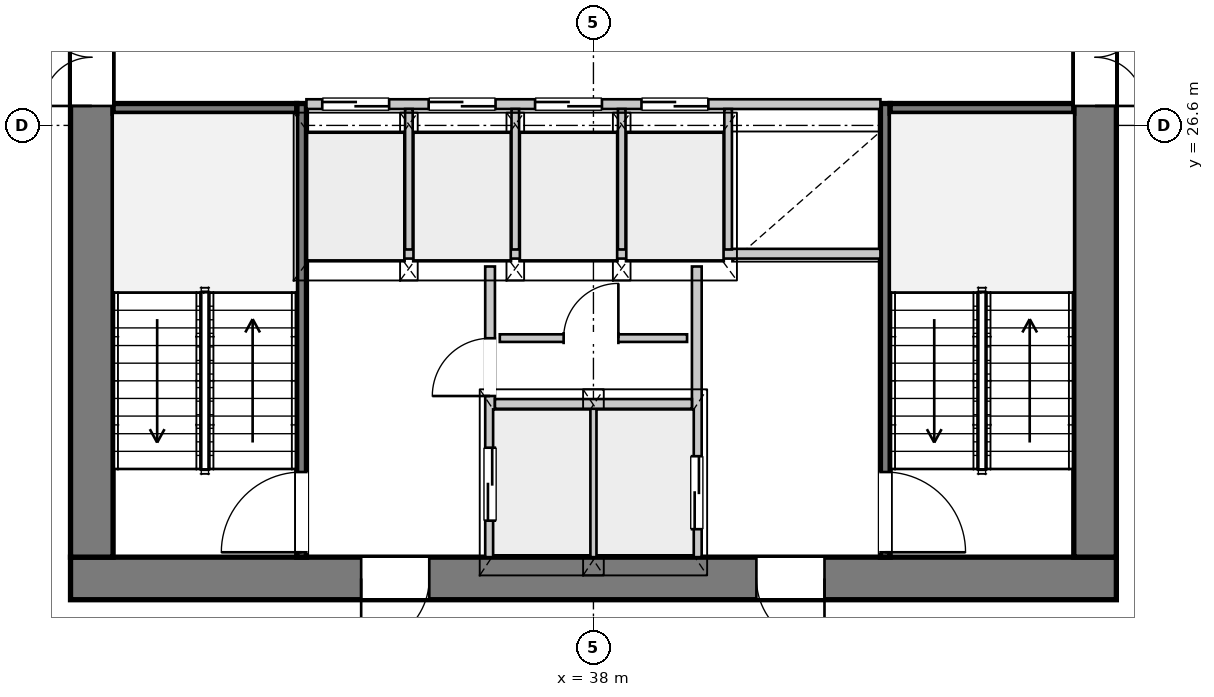
"""IFC4 building model, lengths in metres.
Left out: names, types, materials, properties, quantities, classifications, styles, units other than length and angle.
Written with IfcOpenShell. Run it as: python <this file> out.ifc"""

import sys

from ifc_helpers import new_model, si_unit, direction, frame, frame_2d, origin, place, context, subcontext, project, spatial, rectangle, extrude, source, transform, mapped, element, fill, save


model = new_model("IFC4")
c1 = context("Model", 3, precision=1e-05, world=origin(), true_north=direction((0.0, 1.0)))
c2 = subcontext(c1, "Body", "Model", "MODEL_VIEW")
j1 = project(units=[si_unit("LENGTHUNIT", "METRE"), si_unit("PLANEANGLEUNIT", "RADIAN")], contexts=[c1])
p1 = place(None, origin())
s1 = spatial("IfcSite", under=j1, at=p1, CompositionType="ELEMENT")
p2 = place(p1, origin())
s2 = spatial("IfcBuilding", under=s1, at=p2, CompositionType="ELEMENT")
p3 = place(p2, frame((0.0, 0.0, 102.15)))
s3 = spatial("IfcBuildingStorey", under=s2, at=p3, CompositionType="ELEMENT", Elevation=102.15)
p4 = place(p3, frame((46.6, 19.15, 0.0), z_axis=(0.0, 0.0, 1.0), x_axis=(-1.0, 0.0, 0.0)))
e1 = element("IfcWall", 1, at=p4, inside=s3, PredefinedType="SHEAR", context=c2, shape_type="SweptSolid", body=[
    extrude(rectangle(XDim=17.2, YDim=0.7, at=frame_2d((8.6, 0.0))), origin(), (0.0, 0.0, 1.0), 3.3),
])
p5 = place(p4, frame((4.8, 0.0, 0.0)))
e2 = element("IfcOpeningElement", 2, at=p5, cuts=e1, PredefinedType="OPENING", context=c2, shape_type="SweptSolid", body=[
    extrude(rectangle(XDim=1.12, YDim=2.25, at=frame_2d((0.56, 1.125))), frame((0.0, 0.36, 0.0), z_axis=(0.0, -1.0, 0.0), x_axis=(1.0, 0.0, 0.0)), (0.0, 0.0, 1.0), 0.72),
])
p6 = place(p4, frame((11.3, 0.0, 0.0)))
e3 = element("IfcOpeningElement", 3, at=p6, cuts=e1, PredefinedType="OPENING", context=c2, shape_type="SweptSolid", body=[
    extrude(rectangle(XDim=1.12, YDim=2.25, at=frame_2d((0.56, 1.125))), frame((0.0, 0.36, 0.0), z_axis=(0.0, -1.0, 0.0), x_axis=(1.0, 0.0, 0.0)), (0.0, 0.0, 1.0), 0.72),
])
p7 = place(p3, frame((29.75, 19.5, 0.0), z_axis=(0.0, 0.0, 1.0), x_axis=(0.0, 1.0, 0.0)))
e4 = element("IfcWall", 4, at=p7, inside=s3, PredefinedType="SHEAR", context=c2, shape_type="SweptSolid", body=[
    extrude(rectangle(XDim=14.2, YDim=0.7, at=frame_2d((7.1, 0.0))), origin(), (0.0, 0.0, 1.0), 3.3),
])
p8 = place(p7, frame((7.42, 0.0, 0.0)))
e5 = element("IfcOpeningElement", 5, at=p8, cuts=e4, PredefinedType="OPENING", context=c2, shape_type="SweptSolid", body=[
    extrude(rectangle(XDim=1.6, YDim=2.2, at=frame_2d((0.8, 1.1))), frame((0.0, 0.36, 0.0), z_axis=(0.0, -1.0, 0.0), x_axis=(1.0, 0.0, 0.0)), (0.0, 0.0, 1.0), 0.72),
])
p9 = place(p3, frame((46.25, 33.7, 0.0), z_axis=(0.0, 0.0, 1.0), x_axis=(0.0, -1.0, 0.0)))
e6 = element("IfcWall", 6, at=p9, inside=s3, PredefinedType="SHEAR", context=c2, shape_type="SweptSolid", body=[
    extrude(rectangle(XDim=14.2, YDim=0.7, at=frame_2d((7.1, 0.0))), origin(), (0.0, 0.0, 1.0), 3.3),
])
p10 = place(p9, frame((5.18, 0.0, 0.0)))
e7 = element("IfcOpeningElement", 7, at=p10, cuts=e6, PredefinedType="OPENING", context=c2, shape_type="SweptSolid", body=[
    extrude(rectangle(XDim=1.6, YDim=2.2, at=frame_2d((0.8, 1.1))), frame((0.0, 0.36, 0.0), z_axis=(0.0, -1.0, 0.0), x_axis=(1.0, 0.0, 0.0)), (0.0, 0.0, 1.0), 0.72),
])
p11 = place(p3, frame((33.2, 19.5, 0.0), z_axis=(0.0, 0.0, 1.0), x_axis=(0.0, 1.0, 0.0)))
e8 = element("IfcWall", 8, at=p11, inside=s3, PredefinedType="PARTITIONING", context=c2, shape_type="SweptSolid", body=[
    extrude(rectangle(XDim=7.46, YDim=0.16, at=frame_2d((3.73, 0.0))), origin(), (0.0, 0.0, 1.0), 3.3),
])
p12 = place(p11, frame((0.08, 0.0, 0.0)))
e9 = element("IfcOpeningElement", 9, at=p12, cuts=e8, PredefinedType="OPENING", context=c2, shape_type="SweptSolid", body=[
    extrude(rectangle(XDim=1.32, YDim=2.2, at=frame_2d((0.66, 1.1))), frame((0.0, 0.09, 0.0), z_axis=(0.0, -1.0, 0.0), x_axis=(1.0, 0.0, 0.0)), (0.0, 0.0, 1.0), 0.18),
])
p13 = place(p3, frame((30.1, 26.88, 0.0), z_axis=(0.0, 0.0, 1.0), x_axis=(1.0, 0.0, 0.0)))
e10 = element("IfcWall", 10, at=p13, inside=s3, PredefinedType="PARTITIONING", context=c2, shape_type="SweptSolid", body=[
    extrude(rectangle(XDim=3.02, YDim=0.16, at=frame_2d((1.51, 0.0))), origin(), (0.0, 0.0, 1.0), 3.3),
])
p14 = place(p3, frame((42.8, 26.96, 0.0), z_axis=(0.0, 0.0, 1.0), x_axis=(0.0, -1.0, 0.0)))
e11 = element("IfcWall", 11, at=p14, inside=s3, PredefinedType="PARTITIONING", context=c2, shape_type="SweptSolid", body=[
    extrude(rectangle(XDim=7.46, YDim=0.16, at=frame_2d((3.73, 0.0))), origin(), (0.0, 0.0, 1.0), 3.3),
])
p15 = place(p14, frame((6.06, 0.0, 0.0)))
e12 = element("IfcOpeningElement", 12, at=p15, cuts=e11, PredefinedType="OPENING", context=c2, shape_type="SweptSolid", body=[
    extrude(rectangle(XDim=1.32, YDim=2.2, at=frame_2d((0.66, 1.1))), frame((0.0, 0.09, 0.0), z_axis=(0.0, -1.0, 0.0), x_axis=(1.0, 0.0, 0.0)), (0.0, 0.0, 1.0), 0.18),
])
p16 = place(p3, frame((42.88, 26.88, 0.0), z_axis=(0.0, 0.0, 1.0), x_axis=(1.0, 0.0, 0.0)))
e13 = element("IfcWall", 13, at=p16, inside=s3, PredefinedType="PARTITIONING", context=c2, shape_type="SweptSolid", body=[
    extrude(rectangle(XDim=3.02, YDim=0.16, at=frame_2d((1.51, 0.0))), origin(), (0.0, 0.0, 1.0), 3.3),
])
p17 = place(p3, frame((36.3, 19.5, 0.0), z_axis=(0.0, 0.0, 1.0), x_axis=(0.0, 1.0, 0.0)))
e14 = element("IfcWall", 14, at=p17, inside=s3, PredefinedType="PARTITIONING", context=c2, shape_type="SweptSolid", body=[
    extrude(rectangle(XDim=4.78, YDim=0.16, at=frame_2d((2.39, 0.0))), origin(), (0.0, 0.0, 1.0), 3.3),
])
p18 = place(p17, frame((0.6, 0.0, 0.0)))
e15 = element("IfcOpeningElement", 15, at=p18, cuts=e14, PredefinedType="OPENING", context=c2, shape_type="SweptSolid", body=[
    extrude(rectangle(XDim=1.2, YDim=2.2, at=frame_2d((0.6, 1.1))), frame((0.0, 0.09, 0.0), z_axis=(0.0, -1.0, 0.0), x_axis=(1.0, 0.0, 0.0)), (0.0, 0.0, 1.0), 0.18),
])
p19 = place(p17, frame((2.65, 0.0, 0.0)))
e16 = element("IfcOpeningElement", 16, at=p19, cuts=e14, PredefinedType="OPENING", context=c2, shape_type="SweptSolid", body=[
    extrude(rectangle(XDim=0.95, YDim=2.1, at=frame_2d((0.475, 1.05))), frame((0.0, 0.09, 0.0), z_axis=(0.0, -1.0, 0.0), x_axis=(1.0, 0.0, 0.0)), (0.0, 0.0, 1.0), 0.18),
])
p20 = place(p3, frame((39.7, 24.28, 0.0), z_axis=(0.0, 0.0, 1.0), x_axis=(0.0, -1.0, 0.0)))
e17 = element("IfcWall", 17, at=p20, inside=s3, PredefinedType="PARTITIONING", context=c2, shape_type="SweptSolid", body=[
    extrude(rectangle(XDim=4.78, YDim=0.16, at=frame_2d((2.39, 0.0))), origin(), (0.0, 0.0, 1.0), 3.3),
])
p21 = place(p20, frame((3.12, 0.0, 0.0)))
e18 = element("IfcOpeningElement", 18, at=p21, cuts=e17, PredefinedType="OPENING", context=c2, shape_type="SweptSolid", body=[
    extrude(rectangle(XDim=1.2, YDim=2.2, at=frame_2d((0.6, 1.1))), frame((0.0, 0.09, 0.0), z_axis=(0.0, -1.0, 0.0), x_axis=(1.0, 0.0, 0.0)), (0.0, 0.0, 1.0), 0.18),
])
p22 = place(p3, frame((38.0, 19.5, 0.0), z_axis=(0.0, 0.0, 1.0), x_axis=(0.0, 1.0, 0.0)))
e19 = element("IfcWall", 19, at=p22, inside=s3, PredefinedType="PARTITIONING", context=c2, shape_type="SweptSolid", body=[
    extrude(rectangle(XDim=2.46, YDim=0.125, at=frame_2d((1.23, 0.0))), origin(), (0.0, 0.0, 1.0), 3.3),
])
p23 = place(p3, frame((36.38, 22.02, 0.0), z_axis=(0.0, 0.0, 1.0), x_axis=(1.0, 0.0, 0.0)))
e20 = element("IfcWall", 20, at=p23, inside=s3, PredefinedType="PARTITIONING", context=c2, shape_type="SweptSolid", body=[
    extrude(rectangle(XDim=3.24, YDim=0.16, at=frame_2d((1.62, 0.0))), origin(), (0.0, 0.0, 1.0), 3.3),
])
p24 = place(p3, frame((33.28, 24.49, 0.0), z_axis=(0.0, 0.0, 1.0), x_axis=(1.0, 0.0, 0.0)))
e21 = element("IfcWall", 21, at=p24, inside=s3, PredefinedType="PARTITIONING", context=c2, shape_type="SweptSolid", body=[
    extrude(rectangle(XDim=9.44, YDim=0.16, at=frame_2d((4.72, 0.0))), origin(), (0.0, 0.0, 1.0), 3.3),
])
p25 = place(p3, frame((36.46, 23.102, 0.0), z_axis=(0.0, 0.0, 1.0), x_axis=(1.0, 0.0, 0.0)))
e22 = element("IfcWall", 22, at=p25, inside=s3, PredefinedType="PARTITIONING", context=c2, shape_type="SweptSolid", body=[
    extrude(rectangle(XDim=3.08, YDim=0.125, at=frame_2d((1.54, 0.0))), origin(), (0.0, 0.0, 1.0), 3.3),
])
p26 = place(p25, frame((1.05, 0.0, 0.0)))
e23 = element("IfcOpeningElement", 23, at=p26, cuts=e22, PredefinedType="OPENING", context=c2, shape_type="SweptSolid", body=[
    extrude(rectangle(XDim=0.9, YDim=2.1, at=frame_2d((0.45, 1.05))), frame((0.0, 0.073, 0.0), z_axis=(0.0, -1.0, 0.0), x_axis=(1.0, 0.0, 0.0)), (0.0, 0.0, 1.0), 0.145),
])
p27 = place(p3, frame((33.28, 26.95, 0.0), z_axis=(0.0, 0.0, 1.0), x_axis=(1.0, 0.0, 0.0)))
e24 = element("IfcWall", 24, at=p27, inside=s3, PredefinedType="PARTITIONING", context=c2, shape_type="SweptSolid", body=[
    extrude(rectangle(XDim=9.44, YDim=0.16, at=frame_2d((4.72, 0.0))), origin(), (0.0, 0.0, 1.0), 3.3),
])
p28 = place(p27, frame((0.26, 0.0, 0.0)))
e25 = element("IfcOpeningElement", 25, at=p28, cuts=e24, PredefinedType="OPENING", context=c2, shape_type="SweptSolid", body=[
    extrude(rectangle(XDim=1.1, YDim=2.2, at=frame_2d((0.55, 1.1))), frame((0.0, 0.09, 0.0), z_axis=(0.0, -1.0, 0.0), x_axis=(1.0, 0.0, 0.0)), (0.0, 0.0, 1.0), 0.18),
])
p29 = place(p27, frame((2.01, 0.0, 0.0)))
e26 = element("IfcOpeningElement", 26, at=p29, cuts=e24, PredefinedType="OPENING", context=c2, shape_type="SweptSolid", body=[
    extrude(rectangle(XDim=1.1, YDim=2.2, at=frame_2d((0.55, 1.1))), frame((0.0, 0.09, 0.0), z_axis=(0.0, -1.0, 0.0), x_axis=(1.0, 0.0, 0.0)), (0.0, 0.0, 1.0), 0.18),
])
p30 = place(p27, frame((3.76, 0.0, 0.0)))
e27 = element("IfcOpeningElement", 27, at=p30, cuts=e24, PredefinedType="OPENING", context=c2, shape_type="SweptSolid", body=[
    extrude(rectangle(XDim=1.1, YDim=2.2, at=frame_2d((0.55, 1.1))), frame((0.0, 0.09, 0.0), z_axis=(0.0, -1.0, 0.0), x_axis=(1.0, 0.0, 0.0)), (0.0, 0.0, 1.0), 0.18),
])
p31 = place(p27, frame((5.51, 0.0, 0.0)))
e28 = element("IfcOpeningElement", 28, at=p31, cuts=e24, PredefinedType="OPENING", context=c2, shape_type="SweptSolid", body=[
    extrude(rectangle(XDim=1.1, YDim=2.2, at=frame_2d((0.55, 1.1))), frame((0.0, 0.09, 0.0), z_axis=(0.0, -1.0, 0.0), x_axis=(1.0, 0.0, 0.0)), (0.0, 0.0, 1.0), 0.18),
])
for number, where, z_axis, x_axis in (
    (29, (34.965, 24.56, 0.0), (0.0, 0.0, 1.0), (0.0, 1.0, 0.0)),
    (30, (36.715, 24.56, 0.0), (0.0, 0.0, 1.0), (0.0, 1.0, 0.0)),
    (31, (38.465, 24.56, 0.0), (0.0, 0.0, 1.0), (0.0, 1.0, 0.0)),
    (32, (40.215, 24.56, 0.0), (0.0, 0.0, 1.0), (0.0, 1.0, 0.0)),
):
    element("IfcWall", number, at=place(p3, frame(where, z_axis=z_axis, x_axis=x_axis)), inside=s3, PredefinedType="PARTITIONING", context=c2, shape_type="SweptSolid", body=[
        extrude(rectangle(XDim=2.31, YDim=0.125, at=frame_2d((1.155, 0.0))), origin(), (0.0, 0.0, 1.0), 3.3),
    ])
m1 = source(origin(), c2, "Body", "SweptSolid", [
    extrude(rectangle(XDim=1.12, YDim=2.25, at=frame_2d((0.56, 1.125))), frame((0.0, 0.025, 0.0), z_axis=(0.0, -1.0, 0.0), x_axis=(1.0, 0.0, 0.0)), (0.0, 0.0, 1.0), 0.05),
])
p32 = place(p5, origin())
e33 = element("IfcDoor", 33, at=p32, inside=s3, OperationType="SINGLE_SWING_LEFT", PredefinedType="DOOR", context=c2, shape_type="MappedRepresentation", body=[
    mapped(m1, transform((0.0, 0.0, 0.0), x_axis=(1.0, 0.0, 0.0), y_axis=(0.0, 1.0, 0.0), z_axis=(0.0, 0.0, 1.0), scale=1.0)),
])
fill(e2, e33)
p33 = place(p6, origin())
e34 = element("IfcDoor", 34, at=p33, inside=s3, OperationType="SINGLE_SWING_RIGHT", PredefinedType="DOOR", context=c2, shape_type="MappedRepresentation", body=[
    mapped(m1, transform((0.0, 0.0, 0.0), x_axis=(1.0, 0.0, 0.0), y_axis=(0.0, 1.0, 0.0), z_axis=(0.0, 0.0, 1.0), scale=1.0)),
])
fill(e3, e34)
m2 = source(origin(), c2, "Body", "SweptSolid", [
    extrude(rectangle(XDim=1.6, YDim=2.2, at=frame_2d((0.8, 1.1))), frame((0.0, 0.025, 0.0), z_axis=(0.0, -1.0, 0.0), x_axis=(1.0, 0.0, 0.0)), (0.0, 0.0, 1.0), 0.05),
])
p34 = place(p8, origin())
e35 = element("IfcDoor", 35, at=p34, inside=s3, OperationType="DOUBLE_DOOR_SINGLE_SWING", PredefinedType="DOOR", context=c2, shape_type="MappedRepresentation", body=[
    mapped(m2, transform((0.0, 0.0, 0.0), x_axis=(1.0, 0.0, 0.0), y_axis=(0.0, 1.0, 0.0), z_axis=(0.0, 0.0, 1.0), scale=1.0)),
])
fill(e5, e35)
p35 = place(p10, origin())
e36 = element("IfcDoor", 36, at=p35, inside=s3, OperationType="DOUBLE_DOOR_SINGLE_SWING", PredefinedType="DOOR", context=c2, shape_type="MappedRepresentation", body=[
    mapped(m2, transform((0.0, 0.0, 0.0), x_axis=(1.0, 0.0, 0.0), y_axis=(0.0, 1.0, 0.0), z_axis=(0.0, 0.0, 1.0), scale=1.0)),
])
fill(e7, e36)
m3 = source(origin(), c2, "Body", "SweptSolid", [
    extrude(rectangle(XDim=1.32, YDim=2.2, at=frame_2d((0.66, 1.1))), frame((0.0, 0.025, 0.0), z_axis=(0.0, -1.0, 0.0), x_axis=(1.0, 0.0, 0.0)), (0.0, 0.0, 1.0), 0.05),
])
p36 = place(p12, origin())
e37 = element("IfcDoor", 37, at=p36, inside=s3, OperationType="SINGLE_SWING_LEFT", PredefinedType="DOOR", context=c2, shape_type="MappedRepresentation", body=[
    mapped(m3, transform((0.0, 0.0, 0.0), x_axis=(1.0, 0.0, 0.0), y_axis=(0.0, 1.0, 0.0), z_axis=(0.0, 0.0, 1.0), scale=1.0)),
])
fill(e9, e37)
p37 = place(p15, origin())
e38 = element("IfcDoor", 38, at=p37, inside=s3, OperationType="SINGLE_SWING_RIGHT", PredefinedType="DOOR", context=c2, shape_type="MappedRepresentation", body=[
    mapped(m3, transform((0.0, 0.0, 0.0), x_axis=(1.0, 0.0, 0.0), y_axis=(0.0, 1.0, 0.0), z_axis=(0.0, 0.0, 1.0), scale=1.0)),
])
fill(e12, e38)
m4 = source(origin(), c2, "Body", "SweptSolid", [
    extrude(rectangle(XDim=1.2, YDim=2.2, at=frame_2d((0.6, 1.1))), frame((0.0, 0.025, 0.0), z_axis=(0.0, -1.0, 0.0), x_axis=(1.0, 0.0, 0.0)), (0.0, 0.0, 1.0), 0.05),
])
p38 = place(p18, origin())
e39 = element("IfcDoor", 39, at=p38, inside=s3, OperationType="DOUBLE_DOOR_SLIDING", PredefinedType="DOOR", context=c2, shape_type="MappedRepresentation", body=[
    mapped(m4, transform((0.0, 0.0, 0.0), x_axis=(1.0, 0.0, 0.0), y_axis=(0.0, 1.0, 0.0), z_axis=(0.0, 0.0, 1.0), scale=1.0)),
])
fill(e15, e39)
m5 = source(origin(), c2, "Body", "SweptSolid", [
    extrude(rectangle(XDim=0.95, YDim=2.1, at=frame_2d((0.475, 1.05))), frame((0.0, 0.025, 0.0), z_axis=(0.0, -1.0, 0.0), x_axis=(1.0, 0.0, 0.0)), (0.0, 0.0, 1.0), 0.05),
])
p39 = place(p19, origin())
e40 = element("IfcDoor", 40, at=p39, inside=s3, OperationType="SINGLE_SWING_LEFT", PredefinedType="DOOR", context=c2, shape_type="MappedRepresentation", body=[
    mapped(m5, transform((0.0, 0.0, 0.0), x_axis=(1.0, 0.0, 0.0), y_axis=(0.0, 1.0, 0.0), z_axis=(0.0, 0.0, 1.0), scale=1.0)),
])
fill(e16, e40)
m6 = source(origin(), c2, "Body", "SweptSolid", [
    extrude(rectangle(XDim=0.9, YDim=2.1, at=frame_2d((0.45, 1.05))), frame((0.0, 0.025, 0.0), z_axis=(0.0, -1.0, 0.0), x_axis=(1.0, 0.0, 0.0)), (0.0, 0.0, 1.0), 0.05),
])
p40 = place(p26, origin())
e41 = element("IfcDoor", 41, at=p40, inside=s3, OperationType="SINGLE_SWING_RIGHT", PredefinedType="DOOR", context=c2, shape_type="MappedRepresentation", body=[
    mapped(m6, transform((0.0, 0.0, 0.0), x_axis=(1.0, 0.0, 0.0), y_axis=(0.0, 1.0, 0.0), z_axis=(0.0, 0.0, 1.0), scale=1.0)),
])
fill(e23, e41)
p41 = place(p21, origin())
e42 = element("IfcDoor", 42, at=p41, inside=s3, OperationType="DOUBLE_DOOR_SLIDING", PredefinedType="DOOR", context=c2, shape_type="MappedRepresentation", body=[
    mapped(m4, transform((0.0, 0.0, 0.0), x_axis=(1.0, 0.0, 0.0), y_axis=(0.0, 1.0, 0.0), z_axis=(0.0, 0.0, 1.0), scale=1.0)),
])
fill(e18, e42)
m7 = source(origin(), c2, "Body", "SweptSolid", [
    extrude(rectangle(XDim=1.1, YDim=2.2, at=frame_2d((0.55, 1.1))), frame((0.0, 0.025, 0.0), z_axis=(0.0, -1.0, 0.0), x_axis=(1.0, 0.0, 0.0)), (0.0, 0.0, 1.0), 0.05),
])
p42 = place(p28, origin())
e43 = element("IfcDoor", 43, at=p42, inside=s3, OperationType="DOUBLE_DOOR_SLIDING", PredefinedType="DOOR", context=c2, shape_type="MappedRepresentation", body=[
    mapped(m7, transform((0.0, 0.0, 0.0), x_axis=(1.0, 0.0, 0.0), y_axis=(0.0, 1.0, 0.0), z_axis=(0.0, 0.0, 1.0), scale=1.0)),
])
fill(e25, e43)
p43 = place(p29, origin())
e44 = element("IfcDoor", 44, at=p43, inside=s3, OperationType="DOUBLE_DOOR_SLIDING", PredefinedType="DOOR", context=c2, shape_type="MappedRepresentation", body=[
    mapped(m7, transform((0.0, 0.0, 0.0), x_axis=(1.0, 0.0, 0.0), y_axis=(0.0, 1.0, 0.0), z_axis=(0.0, 0.0, 1.0), scale=1.0)),
])
fill(e26, e44)
p44 = place(p30, origin())
e45 = element("IfcDoor", 45, at=p44, inside=s3, OperationType="DOUBLE_DOOR_SLIDING", PredefinedType="DOOR", context=c2, shape_type="MappedRepresentation", body=[
    mapped(m7, transform((0.0, 0.0, 0.0), x_axis=(1.0, 0.0, 0.0), y_axis=(0.0, 1.0, 0.0), z_axis=(0.0, 0.0, 1.0), scale=1.0)),
])
fill(e27, e45)
p45 = place(p31, origin())
e46 = element("IfcDoor", 46, at=p45, inside=s3, OperationType="DOUBLE_DOOR_SLIDING", PredefinedType="DOOR", context=c2, shape_type="MappedRepresentation", body=[
    mapped(m7, transform((0.0, 0.0, 0.0), x_axis=(1.0, 0.0, 0.0), y_axis=(0.0, 1.0, 0.0), z_axis=(0.0, 0.0, 1.0), scale=1.0)),
])
fill(e28, e46)
save(model, sys.argv[1])
